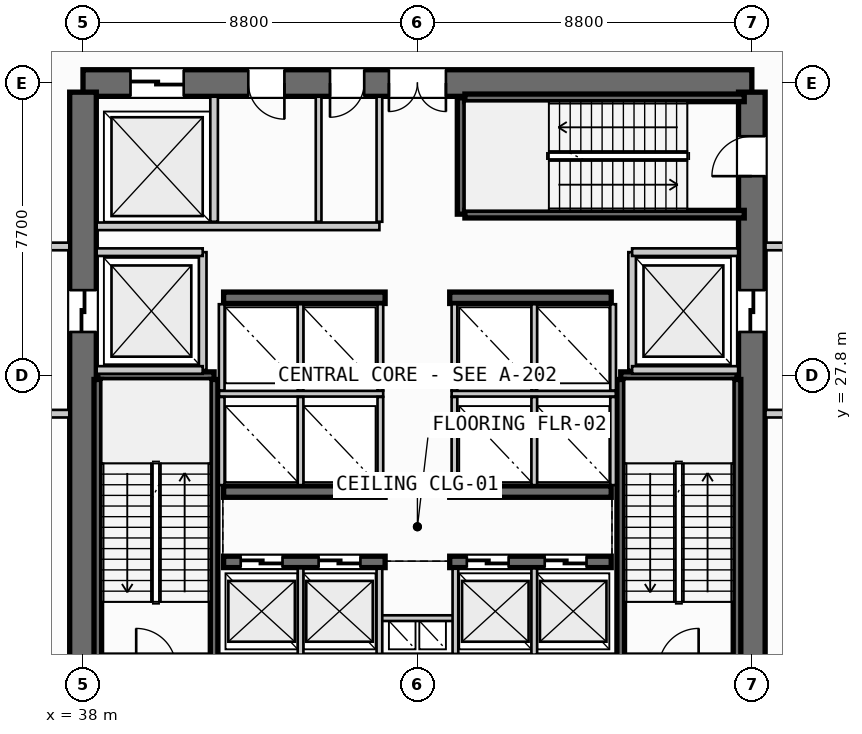
"""IFC4 building model, lengths in metres.
Left out: names, types, materials, properties, quantities, classifications, styles, units other than length and angle.
Written with IfcOpenShell. Run it as: python <this file> out.ifc"""

import sys

from ifc_helpers import new_model, si_unit, direction, frame, frame_2d, origin, place, context, subcontext, project, spatial, rectangle, extrude, source, transform, mapped, element, fill, save


model = new_model("IFC4")
c1 = context("Model", 3, precision=1e-05, world=origin(), true_north=direction((0.0, 1.0)))
c2 = subcontext(c1, "Body", "Model", "MODEL_VIEW")
j1 = project(units=[si_unit("LENGTHUNIT", "METRE"), si_unit("PLANEANGLEUNIT", "RADIAN")], contexts=[c1])
p1 = place(None, origin())
s1 = spatial("IfcSite", under=j1, at=p1, CompositionType="ELEMENT")
p2 = place(p1, origin())
s2 = spatial("IfcBuilding", under=s1, at=p2, CompositionType="ELEMENT")
p3 = place(p2, frame((0.0, 0.0, 5.2)))
s3 = spatial("IfcBuildingStorey", under=s2, at=p3, CompositionType="ELEMENT", Elevation=5.2)
p4 = place(p3, frame((38.0, 20.1, 0.0), z_axis=(0.0, 0.0, 1.0), x_axis=(1.0, 0.0, 0.0)))
e1 = element("IfcWall", 1, at=p4, inside=s3, PredefinedType="SHEAR", context=c2, shape_type="SweptSolid", body=[
    extrude(rectangle(XDim=17.6, YDim=0.7, at=frame_2d((8.8, 0.0))), origin(), (0.0, 0.0, 1.0), 4.55),
])
p5 = place(p4, frame((1.4, 0.0, 0.0)))
e2 = element("IfcOpeningElement", 2, at=p5, cuts=e1, PredefinedType="OPENING", context=c2, shape_type="SweptSolid", body=[
    extrude(rectangle(XDim=1.05, YDim=2.15, at=frame_2d((0.525, 1.075))), frame((0.0, 0.36, 0.0), z_axis=(0.0, -1.0, 0.0), x_axis=(1.0, 0.0, 0.0)), (0.0, 0.0, 1.0), 0.72),
])
p6 = place(p4, frame((15.15, 0.0, 0.0)))
e3 = element("IfcOpeningElement", 3, at=p6, cuts=e1, PredefinedType="OPENING", context=c2, shape_type="SweptSolid", body=[
    extrude(rectangle(XDim=1.05, YDim=2.15, at=frame_2d((0.525, 1.075))), frame((0.0, 0.36, 0.0), z_axis=(0.0, -1.0, 0.0), x_axis=(1.0, 0.0, 0.0)), (0.0, 0.0, 1.0), 0.72),
])
p7 = place(p3, frame((55.6, 35.5, 0.0), z_axis=(0.0, 0.0, 1.0), x_axis=(-1.0, 0.0, 0.0)))
e4 = element("IfcWall", 4, at=p7, inside=s3, PredefinedType="SHEAR", context=c2, shape_type="SweptSolid", body=[
    extrude(rectangle(XDim=17.6, YDim=0.7, at=frame_2d((8.8, 0.0))), origin(), (0.0, 0.0, 1.0), 4.55),
])
p8 = place(p7, frame((8.05, 0.0, 0.0)))
e5 = element("IfcOpeningElement", 5, at=p8, cuts=e4, PredefinedType="OPENING", context=c2, shape_type="SweptSolid", body=[
    extrude(rectangle(XDim=1.5, YDim=2.2, at=frame_2d((0.75, 1.1))), frame((0.0, 0.36, 0.0), z_axis=(0.0, -1.0, 0.0), x_axis=(1.0, 0.0, 0.0)), (0.0, 0.0, 1.0), 0.72),
])
p9 = place(p7, frame((14.95, 0.0, 0.0)))
e6 = element("IfcOpeningElement", 6, at=p9, cuts=e4, PredefinedType="OPENING", context=c2, shape_type="SweptSolid", body=[
    extrude(rectangle(XDim=1.4, YDim=2.3, at=frame_2d((0.7, 1.15))), frame((0.0, 0.36, 0.0), z_axis=(0.0, -1.0, 0.0), x_axis=(1.0, 0.0, 0.0)), (0.0, 0.0, 1.0), 0.72),
])
p10 = place(p7, frame((12.3, 0.0, 0.0)))
e7 = element("IfcOpeningElement", 7, at=p10, cuts=e4, PredefinedType="OPENING", context=c2, shape_type="SweptSolid", body=[
    extrude(rectangle(XDim=0.95, YDim=2.15, at=frame_2d((0.475, 1.075))), frame((0.0, 0.36, 0.0), z_axis=(0.0, -1.0, 0.0), x_axis=(1.0, 0.0, 0.0)), (0.0, 0.0, 1.0), 0.72),
])
p11 = place(p7, frame((10.2, 0.0, 0.0)))
e8 = element("IfcOpeningElement", 8, at=p11, cuts=e4, PredefinedType="OPENING", context=c2, shape_type="SweptSolid", body=[
    extrude(rectangle(XDim=0.9, YDim=2.15, at=frame_2d((0.45, 1.075))), frame((0.0, 0.36, 0.0), z_axis=(0.0, -1.0, 0.0), x_axis=(1.0, 0.0, 0.0)), (0.0, 0.0, 1.0), 0.72),
])
p12 = place(p3, frame((38.0, 35.26, 0.0), z_axis=(0.0, 0.0, 1.0), x_axis=(0.0, -1.0, 0.0)))
e9 = element("IfcWall", 9, at=p12, inside=s3, PredefinedType="SHEAR", context=c2, shape_type="SweptSolid", body=[
    extrude(rectangle(XDim=14.92, YDim=0.7, at=frame_2d((7.46, 0.0))), origin(), (0.0, 0.0, 1.0), 4.55),
])
p13 = place(p12, frame((5.21, 0.0, 0.0)))
e10 = element("IfcOpeningElement", 10, at=p13, cuts=e9, PredefinedType="OPENING", context=c2, shape_type="SweptSolid", body=[
    extrude(rectangle(XDim=1.1, YDim=2.2, at=frame_2d((0.55, 1.1))), frame((0.0, 0.36, 0.0), z_axis=(0.0, -1.0, 0.0), x_axis=(1.0, 0.0, 0.0)), (0.0, 0.0, 1.0), 0.72),
])
p14 = place(p3, frame((55.6, 20.34, 0.0), z_axis=(0.0, 0.0, 1.0), x_axis=(0.0, 1.0, 0.0)))
e11 = element("IfcWall", 11, at=p14, inside=s3, PredefinedType="SHEAR", context=c2, shape_type="SweptSolid", body=[
    extrude(rectangle(XDim=14.92, YDim=0.7, at=frame_2d((7.46, 0.0))), origin(), (0.0, 0.0, 1.0), 4.55),
])
p15 = place(p14, frame((12.71, 0.0, 0.0)))
e12 = element("IfcOpeningElement", 12, at=p15, cuts=e11, PredefinedType="OPENING", context=c2, shape_type="SweptSolid", body=[
    extrude(rectangle(XDim=1.05, YDim=2.15, at=frame_2d((0.525, 1.075))), frame((0.0, 0.36, 0.0), z_axis=(0.0, -1.0, 0.0), x_axis=(1.0, 0.0, 0.0)), (0.0, 0.0, 1.0), 0.72),
])
p16 = place(p14, frame((8.61, 0.0, 0.0)))
e13 = element("IfcOpeningElement", 13, at=p16, cuts=e11, PredefinedType="OPENING", context=c2, shape_type="SweptSolid", body=[
    extrude(rectangle(XDim=1.1, YDim=2.2, at=frame_2d((0.55, 1.1))), frame((0.0, 0.36, 0.0), z_axis=(0.0, -1.0, 0.0), x_axis=(1.0, 0.0, 0.0)), (0.0, 0.0, 1.0), 0.72),
])
p17 = place(p3, frame((41.7, 22.9, 0.0), z_axis=(0.0, 0.0, 1.0), x_axis=(1.0, 0.0, 0.0)))
e14 = element("IfcWall", 14, at=p17, inside=s3, PredefinedType="SHEAR", context=c2, shape_type="SweptSolid", body=[
    extrude(rectangle(XDim=4.25, YDim=0.3, at=frame_2d((2.125, 0.0))), origin(), (0.0, 0.0, 1.0), 4.55),
])
p18 = place(p17, frame((0.45, 0.0, 0.0)))
e15 = element("IfcOpeningElement", 15, at=p18, cuts=e14, PredefinedType="OPENING", context=c2, shape_type="SweptSolid", body=[
    extrude(rectangle(XDim=1.1, YDim=2.2, at=frame_2d((0.55, 1.1))), frame((0.0, 0.16, 0.0), z_axis=(0.0, -1.0, 0.0), x_axis=(1.0, 0.0, 0.0)), (0.0, 0.0, 1.0), 0.32),
])
p19 = place(p17, frame((2.5, 0.0, 0.0)))
e16 = element("IfcOpeningElement", 16, at=p19, cuts=e14, PredefinedType="OPENING", context=c2, shape_type="SweptSolid", body=[
    extrude(rectangle(XDim=1.1, YDim=2.2, at=frame_2d((0.55, 1.1))), frame((0.0, 0.16, 0.0), z_axis=(0.0, -1.0, 0.0), x_axis=(1.0, 0.0, 0.0)), (0.0, 0.0, 1.0), 0.32),
])
p20 = place(p3, frame((47.65, 22.9, 0.0), z_axis=(0.0, 0.0, 1.0), x_axis=(1.0, 0.0, 0.0)))
e17 = element("IfcWall", 17, at=p20, inside=s3, PredefinedType="SHEAR", context=c2, shape_type="SweptSolid", body=[
    extrude(rectangle(XDim=4.25, YDim=0.3, at=frame_2d((2.125, 0.0))), origin(), (0.0, 0.0, 1.0), 4.55),
])
p21 = place(p20, frame((0.45, 0.0, 0.0)))
e18 = element("IfcOpeningElement", 18, at=p21, cuts=e17, PredefinedType="OPENING", context=c2, shape_type="SweptSolid", body=[
    extrude(rectangle(XDim=1.1, YDim=2.2, at=frame_2d((0.55, 1.1))), frame((0.0, 0.16, 0.0), z_axis=(0.0, -1.0, 0.0), x_axis=(1.0, 0.0, 0.0)), (0.0, 0.0, 1.0), 0.32),
])
p22 = place(p20, frame((2.5, 0.0, 0.0)))
e19 = element("IfcOpeningElement", 19, at=p22, cuts=e17, PredefinedType="OPENING", context=c2, shape_type="SweptSolid", body=[
    extrude(rectangle(XDim=1.1, YDim=2.2, at=frame_2d((0.55, 1.1))), frame((0.0, 0.16, 0.0), z_axis=(0.0, -1.0, 0.0), x_axis=(1.0, 0.0, 0.0)), (0.0, 0.0, 1.0), 0.32),
])
for number, where, z_axis, x_axis in (
    (20, (41.7, 24.75, 0.0), (0.0, 0.0, 1.0), (1.0, 0.0, 0.0)),
    (21, (47.65, 24.75, 0.0), (0.0, 0.0, 1.0), (1.0, 0.0, 0.0)),
    (22, (41.7, 29.85, 0.0), (0.0, 0.0, 1.0), (1.0, 0.0, 0.0)),
    (23, (47.65, 29.85, 0.0), (0.0, 0.0, 1.0), (1.0, 0.0, 0.0)),
):
    element("IfcWall", number, at=place(p3, frame(where, z_axis=z_axis, x_axis=x_axis)), inside=s3, PredefinedType="SHEAR", context=c2, shape_type="SweptSolid", body=[
        extrude(rectangle(XDim=4.25, YDim=0.3, at=frame_2d((2.125, 0.0))), origin(), (0.0, 0.0, 1.0), 4.55),
    ])
p23 = place(p3, frame((38.39, 27.8, 0.0), z_axis=(0.0, 0.0, 1.0), x_axis=(1.0, 0.0, 0.0)))
e24 = element("IfcWall", 24, at=p23, inside=s3, PredefinedType="SHEAR", context=c2, shape_type="SweptSolid", body=[
    extrude(rectangle(XDim=3.06, YDim=0.2, at=frame_2d((1.53, 0.0))), origin(), (0.0, 0.0, 1.0), 4.55),
])
for number, where, z_axis, x_axis in (
    (25, (41.45, 27.7, 0.0), (0.0, 0.0, 1.0), (0.0, -1.0, 0.0)),
    (26, (38.39, 20.35, 0.0), (0.0, 0.0, 1.0), (0.0, 1.0, 0.0)),
):
    element("IfcWall", number, at=place(p3, frame(where, z_axis=z_axis, x_axis=x_axis)), inside=s3, PredefinedType="SHEAR", context=c2, shape_type="SweptSolid", body=[
        extrude(rectangle(XDim=7.35, YDim=0.2, at=frame_2d((3.675, 0.0))), origin(), (0.0, 0.0, 1.0), 4.55),
    ])
p24 = place(p3, frame((52.15, 27.8, 0.0), z_axis=(0.0, 0.0, 1.0), x_axis=(1.0, 0.0, 0.0)))
e27 = element("IfcWall", 27, at=p24, inside=s3, PredefinedType="SHEAR", context=c2, shape_type="SweptSolid", body=[
    extrude(rectangle(XDim=3.06, YDim=0.2, at=frame_2d((1.53, 0.0))), origin(), (0.0, 0.0, 1.0), 4.55),
])
for number, where, z_axis, x_axis in (
    (28, (55.21, 27.7, 0.0), (0.0, 0.0, 1.0), (0.0, -1.0, 0.0)),
    (29, (52.15, 20.35, 0.0), (0.0, 0.0, 1.0), (0.0, 1.0, 0.0)),
):
    element("IfcWall", number, at=place(p3, frame(where, z_axis=z_axis, x_axis=x_axis)), inside=s3, PredefinedType="SHEAR", context=c2, shape_type="SweptSolid", body=[
        extrude(rectangle(XDim=7.35, YDim=0.2, at=frame_2d((3.675, 0.0))), origin(), (0.0, 0.0, 1.0), 4.55),
    ])
p25 = place(p3, frame((47.95, 32.05, 0.0), z_axis=(0.0, 0.0, 1.0), x_axis=(0.0, 1.0, 0.0)))
e30 = element("IfcWall", 30, at=p25, inside=s3, PredefinedType="SHEAR", context=c2, shape_type="SweptSolid", body=[
    extrude(rectangle(XDim=3.06, YDim=0.2, at=frame_2d((1.53, 0.0))), origin(), (0.0, 0.0, 1.0), 4.55),
])
for number, where, z_axis, x_axis in (
    (31, (48.05, 35.11, 0.0), (0.0, 0.0, 1.0), (1.0, 0.0, 0.0)),
    (32, (55.4, 32.05, 0.0), (0.0, 0.0, 1.0), (-1.0, 0.0, 0.0)),
):
    element("IfcWall", number, at=place(p3, frame(where, z_axis=z_axis, x_axis=x_axis)), inside=s3, PredefinedType="SHEAR", context=c2, shape_type="SweptSolid", body=[
        extrude(rectangle(XDim=7.35, YDim=0.2, at=frame_2d((3.675, 0.0))), origin(), (0.0, 0.0, 1.0), 4.55),
    ])
p26 = place(p3, frame((45.8, 21.42, 0.0), z_axis=(0.0, 0.0, 1.0), x_axis=(1.0, 0.0, 0.0)))
e33 = element("IfcWall", 33, at=p26, inside=s3, PredefinedType="PARTITIONING", context=c2, shape_type="SweptSolid", body=[
    extrude(rectangle(XDim=2.0, YDim=0.15, at=frame_2d((1.0, 0.0))), origin(), (0.0, 0.0, 1.0), 3.763),
])
for number, where, z_axis, x_axis in (
    (34, (45.8, 20.48, 0.0), (0.0, 0.0, 1.0), (0.0, 1.0, 0.0)),
    (35, (47.8, 20.48, 0.0), (0.0, 0.0, 1.0), (0.0, 1.0, 0.0)),
):
    element("IfcWall", number, at=place(p3, frame(where, z_axis=z_axis, x_axis=x_axis)), inside=s3, PredefinedType="PARTITIONING", context=c2, shape_type="SweptSolid", body=[
        extrude(rectangle(XDim=2.24, YDim=0.15, at=frame_2d((1.12, 0.0))), origin(), (0.0, 0.0, 1.0), 3.763),
    ])
p27 = place(p3, frame((41.15, 27.95, 0.0), z_axis=(0.0, 0.0, 1.0), x_axis=(0.0, 1.0, 0.0)))
e36 = element("IfcWall", 36, at=p27, inside=s3, PredefinedType="PARTITIONING", context=c2, shape_type="SweptSolid", body=[
    extrude(rectangle(XDim=3.1, YDim=0.2, at=frame_2d((1.55, 0.0))), origin(), (0.0, 0.0, 1.0), 3.763),
])
for number, where, z_axis, x_axis in (
    (37, (38.36, 27.95, 0.0), (0.0, 0.0, 1.0), (1.0, 0.0, 0.0)),
    (38, (38.36, 31.05, 0.0), (0.0, 0.0, 1.0), (1.0, 0.0, 0.0)),
):
    element("IfcWall", number, at=place(p3, frame(where, z_axis=z_axis, x_axis=x_axis)), inside=s3, PredefinedType="PARTITIONING", context=c2, shape_type="SweptSolid", body=[
        extrude(rectangle(XDim=2.79, YDim=0.2, at=frame_2d((1.395, 0.0))), origin(), (0.0, 0.0, 1.0), 3.763),
    ])
for number, where, z_axis, x_axis in (
    (39, (34.5, 26.8, 0.0), (0.0, 0.0, 1.0), (1.0, 0.0, 0.0)),
    (40, (34.5, 31.2, 0.0), (0.0, 0.0, 1.0), (1.0, 0.0, 0.0)),
):
    element("IfcWall", number, at=place(p3, frame(where, z_axis=z_axis, x_axis=x_axis)), inside=s3, PredefinedType="PARTITIONING", context=c2, shape_type="SweptSolid", body=[
        extrude(rectangle(XDim=3.14, YDim=0.2, at=frame_2d((1.57, 0.0))), origin(), (0.0, 0.0, 1.0), 3.763),
    ])
p28 = place(p3, frame((52.45, 27.95, 0.0), z_axis=(0.0, 0.0, 1.0), x_axis=(0.0, 1.0, 0.0)))
e41 = element("IfcWall", 41, at=p28, inside=s3, PredefinedType="PARTITIONING", context=c2, shape_type="SweptSolid", body=[
    extrude(rectangle(XDim=3.1, YDim=0.2, at=frame_2d((1.55, 0.0))), origin(), (0.0, 0.0, 1.0), 3.763),
])
for number, where, z_axis, x_axis in (
    (42, (52.45, 27.95, 0.0), (0.0, 0.0, 1.0), (1.0, 0.0, 0.0)),
    (43, (52.45, 31.05, 0.0), (0.0, 0.0, 1.0), (1.0, 0.0, 0.0)),
):
    element("IfcWall", number, at=place(p3, frame(where, z_axis=z_axis, x_axis=x_axis)), inside=s3, PredefinedType="PARTITIONING", context=c2, shape_type="SweptSolid", body=[
        extrude(rectangle(XDim=2.79, YDim=0.2, at=frame_2d((1.395, 0.0))), origin(), (0.0, 0.0, 1.0), 3.763),
    ])
for number, where, z_axis, x_axis in (
    (44, (55.96, 26.8, 0.0), (0.0, 0.0, 1.0), (1.0, 0.0, 0.0)),
    (45, (55.96, 31.2, 0.0), (0.0, 0.0, 1.0), (1.0, 0.0, 0.0)),
):
    element("IfcWall", number, at=place(p3, frame(where, z_axis=z_axis, x_axis=x_axis)), inside=s3, PredefinedType="PARTITIONING", context=c2, shape_type="SweptSolid", body=[
        extrude(rectangle(XDim=3.14, YDim=0.2, at=frame_2d((1.57, 0.0))), origin(), (0.0, 0.0, 1.0), 3.763),
    ])
for number, where, z_axis, x_axis in (
    (46, (43.725, 20.46, 0.0), (0.0, 0.0, 1.0), (0.0, 1.0, 0.0)),
    (47, (49.875, 20.46, 0.0), (0.0, 0.0, 1.0), (0.0, 1.0, 0.0)),
):
    element("IfcWall", number, at=place(p3, frame(where, z_axis=z_axis, x_axis=x_axis)), inside=s3, PredefinedType="PARTITIONING", context=c2, shape_type="SweptSolid", body=[
        extrude(rectangle(XDim=2.27, YDim=0.15, at=frame_2d((1.135, 0.0))), origin(), (0.0, 0.0, 1.0), 3.763),
    ])
p29 = place(p3, frame((41.58, 27.325, 0.0), z_axis=(0.0, 0.0, 1.0), x_axis=(1.0, 0.0, 0.0)))
e48 = element("IfcWall", 48, at=p29, inside=s3, PredefinedType="PARTITIONING", context=c2, shape_type="SweptSolid", body=[
    extrude(rectangle(XDim=4.32, YDim=0.15, at=frame_2d((2.16, 0.0))), origin(), (0.0, 0.0, 1.0), 3.763),
])
p30 = place(p3, frame((47.7, 27.325, 0.0), z_axis=(0.0, 0.0, 1.0), x_axis=(1.0, 0.0, 0.0)))
e49 = element("IfcWall", 49, at=p30, inside=s3, PredefinedType="PARTITIONING", context=c2, shape_type="SweptSolid", body=[
    extrude(rectangle(XDim=4.32, YDim=0.15, at=frame_2d((2.16, 0.0))), origin(), (0.0, 0.0, 1.0), 3.763),
])
for number, where, z_axis, x_axis in (
    (50, (41.65, 24.92, 0.0), (0.0, 0.0, 1.0), (0.0, 1.0, 0.0)),
    (51, (43.725, 24.92, 0.0), (0.0, 0.0, 1.0), (0.0, 1.0, 0.0)),
    (52, (45.825, 24.92, 0.0), (0.0, 0.0, 1.0), (0.0, 1.0, 0.0)),
    (53, (47.775, 24.92, 0.0), (0.0, 0.0, 1.0), (0.0, 1.0, 0.0)),
    (54, (49.875, 24.92, 0.0), (0.0, 0.0, 1.0), (0.0, 1.0, 0.0)),
    (55, (51.95, 24.92, 0.0), (0.0, 0.0, 1.0), (0.0, 1.0, 0.0)),
):
    element("IfcWall", number, at=place(p3, frame(where, z_axis=z_axis, x_axis=x_axis)), inside=s3, PredefinedType="PARTITIONING", context=c2, shape_type="SweptSolid", body=[
        extrude(rectangle(XDim=2.32, YDim=0.15, at=frame_2d((1.16, 0.0))), origin(), (0.0, 0.0, 1.0), 3.763),
    ])
for number, where, z_axis, x_axis in (
    (56, (41.65, 27.41, 0.0), (0.0, 0.0, 1.0), (0.0, 1.0, 0.0)),
    (57, (43.725, 27.41, 0.0), (0.0, 0.0, 1.0), (0.0, 1.0, 0.0)),
    (58, (45.825, 27.41, 0.0), (0.0, 0.0, 1.0), (0.0, 1.0, 0.0)),
    (59, (47.775, 27.41, 0.0), (0.0, 0.0, 1.0), (0.0, 1.0, 0.0)),
    (60, (49.875, 27.41, 0.0), (0.0, 0.0, 1.0), (0.0, 1.0, 0.0)),
    (61, (51.95, 27.41, 0.0), (0.0, 0.0, 1.0), (0.0, 1.0, 0.0)),
):
    element("IfcWall", number, at=place(p3, frame(where, z_axis=z_axis, x_axis=x_axis)), inside=s3, PredefinedType="PARTITIONING", context=c2, shape_type="SweptSolid", body=[
        extrude(rectangle(XDim=2.27, YDim=0.15, at=frame_2d((1.135, 0.0))), origin(), (0.0, 0.0, 1.0), 3.763),
    ])
p31 = place(p3, frame((41.45, 31.85, 0.0), z_axis=(0.0, 0.0, 1.0), x_axis=(0.0, 1.0, 0.0)))
e62 = element("IfcWall", 62, at=p31, inside=s3, PredefinedType="PARTITIONING", context=c2, shape_type="SweptSolid", body=[
    extrude(rectangle(XDim=3.29, YDim=0.2, at=frame_2d((1.645, 0.0))), origin(), (0.0, 0.0, 1.0), 3.763),
])
p32 = place(p3, frame((38.36, 31.73, 0.0), z_axis=(0.0, 0.0, 1.0), x_axis=(1.0, 0.0, 0.0)))
e63 = element("IfcWall", 63, at=p32, inside=s3, PredefinedType="PARTITIONING", context=c2, shape_type="SweptSolid", body=[
    extrude(rectangle(XDim=7.44, YDim=0.2, at=frame_2d((3.72, 0.0))), origin(), (0.0, 0.0, 1.0), 3.763),
])
p33 = place(p3, frame((45.8, 31.85, 0.0), z_axis=(0.0, 0.0, 1.0), x_axis=(0.0, 1.0, 0.0)))
e64 = element("IfcWall", 64, at=p33, inside=s3, PredefinedType="PARTITIONING", context=c2, shape_type="SweptSolid", body=[
    extrude(rectangle(XDim=3.29, YDim=0.15, at=frame_2d((1.645, 0.0))), origin(), (0.0, 0.0, 1.0), 3.763),
])
p34 = place(p3, frame((44.2, 31.85, 0.0), z_axis=(0.0, 0.0, 1.0), x_axis=(0.0, 1.0, 0.0)))
e65 = element("IfcWall", 65, at=p34, inside=s3, PredefinedType="PLUMBINGWALL", context=c2, shape_type="SweptSolid", body=[
    extrude(rectangle(XDim=3.29, YDim=0.15, at=frame_2d((1.645, 0.0))), origin(), (0.0, 0.0, 1.0), 3.763),
])
m1 = source(origin(), c2, "Body", "SweptSolid", [
    extrude(rectangle(XDim=1.05, YDim=2.15, at=frame_2d((0.525, 1.075))), frame((0.0, 0.025, 0.0), z_axis=(0.0, -1.0, 0.0), x_axis=(1.0, 0.0, 0.0)), (0.0, 0.0, 1.0), 0.05),
])
p35 = place(p15, origin())
e66 = element("IfcDoor", 66, at=p35, inside=s3, OperationType="SINGLE_SWING_LEFT", PredefinedType="DOOR", context=c2, shape_type="MappedRepresentation", body=[
    mapped(m1, transform((0.0, 0.0, 0.0), scale=1.0)),
])
fill(e12, e66)
m2 = source(origin(), c2, "Body", "SweptSolid", [
    extrude(rectangle(XDim=1.5, YDim=2.2, at=frame_2d((0.75, 1.1))), frame((0.0, 0.025, 0.0), z_axis=(0.0, -1.0, 0.0), x_axis=(1.0, 0.0, 0.0)), (0.0, 0.0, 1.0), 0.05),
])
p36 = place(p8, origin())
e67 = element("IfcDoor", 67, at=p36, inside=s3, OperationType="DOUBLE_DOOR_SINGLE_SWING", PredefinedType="DOOR", context=c2, shape_type="MappedRepresentation", body=[
    mapped(m2, transform((0.0, 0.0, 0.0), scale=1.0)),
])
fill(e5, e67)
m3 = source(origin(), c2, "Body", "SweptSolid", [
    extrude(rectangle(XDim=1.1, YDim=2.2, at=frame_2d((0.55, 1.1))), frame((0.0, 0.025, 0.0), z_axis=(0.0, -1.0, 0.0), x_axis=(1.0, 0.0, 0.0)), (0.0, 0.0, 1.0), 0.05),
])
p37 = place(p13, origin())
e68 = element("IfcDoor", 68, at=p37, inside=s3, OperationType="SLIDING_TO_LEFT", PredefinedType="DOOR", context=c2, shape_type="MappedRepresentation", body=[
    mapped(m3, transform((0.0, 0.0, 0.0), scale=1.0)),
])
fill(e10, e68)
p38 = place(p16, origin())
e69 = element("IfcDoor", 69, at=p38, inside=s3, OperationType="SLIDING_TO_RIGHT", PredefinedType="DOOR", context=c2, shape_type="MappedRepresentation", body=[
    mapped(m3, transform((0.0, 0.0, 0.0), scale=1.0)),
])
fill(e13, e69)
p39 = place(p18, origin())
e70 = element("IfcDoor", 70, at=p39, inside=s3, OperationType="SLIDING_TO_LEFT", PredefinedType="DOOR", context=c2, shape_type="MappedRepresentation", body=[
    mapped(m3, transform((0.0, 0.0, 0.0), scale=1.0)),
])
fill(e15, e70)
p40 = place(p19, origin())
e71 = element("IfcDoor", 71, at=p40, inside=s3, OperationType="SLIDING_TO_LEFT", PredefinedType="DOOR", context=c2, shape_type="MappedRepresentation", body=[
    mapped(m3, transform((0.0, 0.0, 0.0), scale=1.0)),
])
fill(e16, e71)
p41 = place(p21, origin())
e72 = element("IfcDoor", 72, at=p41, inside=s3, OperationType="SLIDING_TO_LEFT", PredefinedType="DOOR", context=c2, shape_type="MappedRepresentation", body=[
    mapped(m3, transform((0.0, 0.0, 0.0), scale=1.0)),
])
fill(e18, e72)
p42 = place(p22, origin())
e73 = element("IfcDoor", 73, at=p42, inside=s3, OperationType="SLIDING_TO_LEFT", PredefinedType="DOOR", context=c2, shape_type="MappedRepresentation", body=[
    mapped(m3, transform((0.0, 0.0, 0.0), scale=1.0)),
])
fill(e19, e73)
m4 = source(origin(), c2, "Body", "SweptSolid", [
    extrude(rectangle(XDim=1.4, YDim=2.3, at=frame_2d((0.7, 1.15))), frame((0.0, 0.025, 0.0), z_axis=(0.0, -1.0, 0.0), x_axis=(1.0, 0.0, 0.0)), (0.0, 0.0, 1.0), 0.05),
])
p43 = place(p9, origin())
e74 = element("IfcDoor", 74, at=p43, inside=s3, OperationType="SLIDING_TO_RIGHT", PredefinedType="DOOR", context=c2, shape_type="MappedRepresentation", body=[
    mapped(m4, transform((0.0, 0.0, 0.0), scale=1.0)),
])
fill(e6, e74)
m5 = source(origin(), c2, "Body", "SweptSolid", [
    extrude(rectangle(XDim=0.95, YDim=2.15, at=frame_2d((0.475, 1.075))), frame((0.0, 0.025, 0.0), z_axis=(0.0, -1.0, 0.0), x_axis=(1.0, 0.0, 0.0)), (0.0, 0.0, 1.0), 0.05),
])
p44 = place(p10, origin())
e75 = element("IfcDoor", 75, at=p44, inside=s3, OperationType="SINGLE_SWING_LEFT", PredefinedType="DOOR", context=c2, shape_type="MappedRepresentation", body=[
    mapped(m5, transform((0.0, 0.0, 0.0), scale=1.0)),
])
fill(e7, e75)
m6 = source(origin(), c2, "Body", "SweptSolid", [
    extrude(rectangle(XDim=0.9, YDim=2.15, at=frame_2d((0.45, 1.075))), frame((0.0, 0.025, 0.0), z_axis=(0.0, -1.0, 0.0), x_axis=(1.0, 0.0, 0.0)), (0.0, 0.0, 1.0), 0.05),
])
p45 = place(p11, origin())
e76 = element("IfcDoor", 76, at=p45, inside=s3, OperationType="SINGLE_SWING_RIGHT", PredefinedType="DOOR", context=c2, shape_type="MappedRepresentation", body=[
    mapped(m6, transform((0.0, 0.0, 0.0), scale=1.0)),
])
fill(e8, e76)
save(model, sys.argv[1])
